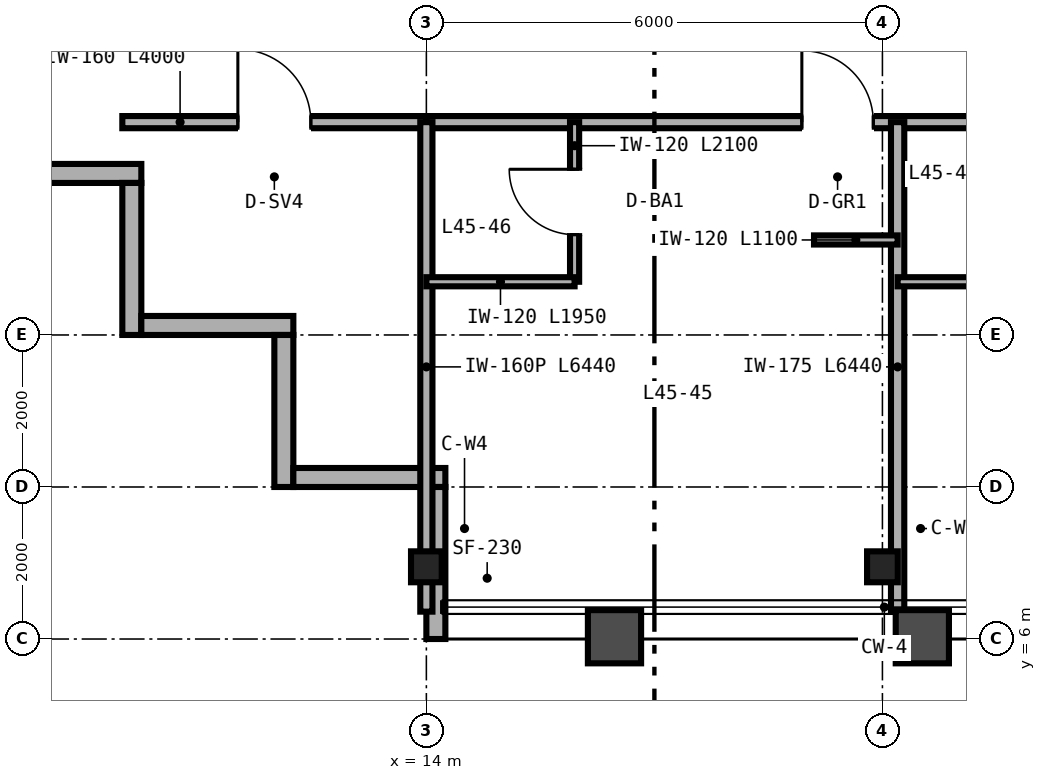
"""IFC4 building model, lengths in metres.
Left out: names, types, materials, properties, quantities, classifications, styles, units other than length and angle.
Written with IfcOpenShell. Run it as: python <this file> out.ifc"""

import sys

from ifc_helpers import new_model, si_unit, direction, frame, frame_2d, origin, origin_2d, place, context, subcontext, project, spatial, rectangle, i_section, extrude, source, transform, mapped, element, fill, save


model = new_model("IFC4")
c1 = context("Model", 3, precision=1e-05, world=origin(), true_north=direction((0.0, 1.0)))
c2 = subcontext(c1, "Body", "Model", "MODEL_VIEW")
j1 = project(units=[si_unit("LENGTHUNIT", "METRE"), si_unit("PLANEANGLEUNIT", "RADIAN")], contexts=[c1])
p1 = place(None, origin())
s1 = spatial("IfcSite", under=j1, at=p1, CompositionType="ELEMENT")
p2 = place(p1, origin())
s2 = spatial("IfcBuilding", under=s1, at=p2, CompositionType="ELEMENT")
p3 = place(p2, frame((0.0, 0.0, 181.2)))
s3 = spatial("IfcBuildingStorey", under=s2, at=p3, CompositionType="ELEMENT", Elevation=181.2)
m1 = source(origin(), c2, "Body", "SweptSolid", [
    extrude(i_section(OverallWidth=0.404, OverallDepth=0.407, WebThickness=0.027, FlangeThickness=0.044, FilletRadius=0.025, at=origin_2d()), origin(), (0.0, 0.0, 1.0), 3.37),
])
for number, where, z_axis, x_axis in (
    (1, (14.0, 6.95, 0.0), (0.0, 0.0, 1.0), (1.0, 0.0, 0.0)),
    (2, (20.0, 6.95, 0.0), (0.0, 0.0, 1.0), (1.0, 0.0, 0.0)),
):
    element("IfcColumn", number, at=place(p3, frame(where, z_axis=z_axis, x_axis=x_axis)), inside=s3, PredefinedType="COLUMN", context=c2, shape_type="MappedRepresentation", body=[
        mapped(m1, transform((0.0, 0.0, 0.0), scale=1.0)),
    ])
p4 = place(p3, frame((8.0, 12.125, 0.0), z_axis=(0.0, 0.0, 1.0), x_axis=(1.0, 0.0, 0.0)))
e3 = element("IfcWall", 3, at=p4, inside=s3, PredefinedType="SOLIDWALL", context=c2, shape_type="SweptSolid", body=[
    extrude(rectangle(XDim=2.25, YDim=0.25, at=frame_2d((1.125, 0.0))), origin(), (0.0, 0.0, 1.0), 3.37),
])
for number, where, z_axis, x_axis in (
    (4, (10.125, 12.0, 0.0), (0.0, 0.0, 1.0), (0.0, -1.0, 0.0)),
    (5, (10.25, 10.125, 0.0), (0.0, 0.0, 1.0), (1.0, 0.0, 0.0)),
    (6, (12.125, 10.0, 0.0), (0.0, 0.0, 1.0), (0.0, -1.0, 0.0)),
    (7, (12.25, 8.125, 0.0), (0.0, 0.0, 1.0), (1.0, 0.0, 0.0)),
):
    element("IfcWall", number, at=place(p3, frame(where, z_axis=z_axis, x_axis=x_axis)), inside=s3, PredefinedType="SOLIDWALL", context=c2, shape_type="SweptSolid", body=[
        extrude(rectangle(XDim=2.0, YDim=0.25, at=frame_2d((1.0, 0.0))), origin(), (0.0, 0.0, 1.0), 3.37),
    ])
p5 = place(p3, frame((14.125, 8.0, 0.0), z_axis=(0.0, 0.0, 1.0), x_axis=(0.0, -1.0, 0.0)))
e8 = element("IfcWall", 8, at=p5, inside=s3, PredefinedType="SOLIDWALL", context=c2, shape_type="SweptSolid", body=[
    extrude(rectangle(XDim=2.0, YDim=0.25, at=frame_2d((1.0, 0.0))), origin(), (0.0, 0.0, 1.0), 2.677),
])
p6 = place(p3, frame((10.0, 12.8, 0.0), z_axis=(0.0, 0.0, 1.0), x_axis=(1.0, 0.0, 0.0)))
e9 = element("IfcWall", 9, at=p6, inside=s3, PredefinedType="PARTITIONING", context=c2, shape_type="SweptSolid", body=[
    extrude(rectangle(XDim=4.0, YDim=0.16, at=frame_2d((2.0, 0.0))), origin(), (0.0, 0.0, 1.0), 3.37),
])
p7 = place(p6, frame((1.52, 0.0, 0.0)))
e10 = element("IfcOpeningElement", 10, at=p7, cuts=e9, PredefinedType="OPENING", context=c2, shape_type="SweptSolid", body=[
    extrude(rectangle(XDim=0.96, YDim=2.15, at=frame_2d((0.48, 1.075))), frame((0.0, 0.09, 0.0), z_axis=(0.0, -1.0, 0.0), x_axis=(1.0, 0.0, 0.0)), (0.0, 0.0, 1.0), 0.18),
])
p8 = place(p3, frame((14.0, 12.8, 0.0), z_axis=(0.0, 0.0, 1.0), x_axis=(1.0, 0.0, 0.0)))
e11 = element("IfcWall", 11, at=p8, inside=s3, PredefinedType="PARTITIONING", context=c2, shape_type="SweptSolid", body=[
    extrude(rectangle(XDim=12.0, YDim=0.16, at=frame_2d((6.0, 0.0))), origin(), (0.0, 0.0, 1.0), 2.913),
])
p9 = place(p8, frame((4.94, 0.0, 0.0)))
e12 = element("IfcOpeningElement", 12, at=p9, cuts=e11, PredefinedType="OPENING", context=c2, shape_type="SweptSolid", body=[
    extrude(rectangle(XDim=0.94, YDim=2.15, at=frame_2d((0.47, 1.075))), frame((0.0, 0.09, 0.0), z_axis=(0.0, -1.0, 0.0), x_axis=(1.0, 0.0, 0.0)), (0.0, 0.0, 1.0), 0.18),
])
p10 = place(p8, frame((10.74, 0.0, 0.0)))
e13 = element("IfcOpeningElement", 13, at=p10, cuts=e11, PredefinedType="OPENING", context=c2, shape_type="SweptSolid", body=[
    extrude(rectangle(XDim=0.94, YDim=2.15, at=frame_2d((0.47, 1.075))), frame((0.0, 0.09, 0.0), z_axis=(0.0, -1.0, 0.0), x_axis=(1.0, 0.0, 0.0)), (0.0, 0.0, 1.0), 0.18),
])
p11 = place(p3, frame((14.0, 6.36, 0.0), z_axis=(0.0, 0.0, 1.0), x_axis=(0.0, 1.0, 0.0)))
e14 = element("IfcWall", 14, at=p11, inside=s3, PredefinedType="PARTITIONING", context=c2, shape_type="SweptSolid", body=[
    extrude(rectangle(XDim=6.44, YDim=0.16, at=frame_2d((3.22, 0.0))), origin(), (0.0, 0.0, 1.0), 2.677),
])
p12 = place(p3, frame((20.2, 6.36, 0.0), z_axis=(0.0, 0.0, 1.0), x_axis=(0.0, 1.0, 0.0)))
e15 = element("IfcWall", 15, at=p12, inside=s3, PredefinedType="PARTITIONING", context=c2, shape_type="SweptSolid", body=[
    extrude(rectangle(XDim=6.44, YDim=0.175, at=frame_2d((3.22, 0.0))), origin(), (0.0, 0.0, 1.0), 2.677),
])
p13 = place(p3, frame((15.95, 10.7, 0.0), z_axis=(0.0, 0.0, 1.0), x_axis=(0.0, 1.0, 0.0)))
e16 = element("IfcWall", 16, at=p13, inside=s3, PredefinedType="PARTITIONING", context=c2, shape_type="SweptSolid", body=[
    extrude(rectangle(XDim=2.1, YDim=0.12, at=frame_2d((1.05, 0.0))), origin(), (0.0, 0.0, 1.0), 3.37),
])
p14 = place(p13, frame((0.62, 0.0, 0.0)))
e17 = element("IfcOpeningElement", 17, at=p14, cuts=e16, PredefinedType="OPENING", context=c2, shape_type="SweptSolid", body=[
    extrude(rectangle(XDim=0.86, YDim=2.1, at=frame_2d((0.43, 1.05))), frame((0.0, 0.07, 0.0), z_axis=(0.0, -1.0, 0.0), x_axis=(1.0, 0.0, 0.0)), (0.0, 0.0, 1.0), 0.14),
])
p15 = place(p3, frame((14.0, 10.7, 0.0), z_axis=(0.0, 0.0, 1.0), x_axis=(1.0, 0.0, 0.0)))
e18 = element("IfcWall", 18, at=p15, inside=s3, PredefinedType="PARTITIONING", context=c2, shape_type="SweptSolid", body=[
    extrude(rectangle(XDim=1.95, YDim=0.12, at=frame_2d((0.975, 0.0))), origin(), (0.0, 0.0, 1.0), 3.37),
])
p16 = place(p3, frame((19.1, 11.25, 0.0), z_axis=(0.0, 0.0, 1.0), x_axis=(1.0, 0.0, 0.0)))
e19 = element("IfcWall", 19, at=p16, inside=s3, PredefinedType="PARTITIONING", context=c2, shape_type="SweptSolid", body=[
    extrude(rectangle(XDim=1.1, YDim=0.12, at=frame_2d((0.55, 0.0))), origin(), (0.0, 0.0, 1.0), 3.37),
])
p17 = place(p3, frame((20.2, 10.7, 0.0), z_axis=(0.0, 0.0, 1.0), x_axis=(1.0, 0.0, 0.0)))
e20 = element("IfcWall", 20, at=p17, inside=s3, PredefinedType="PARTITIONING", context=c2, shape_type="SweptSolid", body=[
    extrude(rectangle(XDim=1.95, YDim=0.12, at=frame_2d((0.975, 0.0))), origin(), (0.0, 0.0, 1.0), 3.37),
])
m2 = source(origin(), c2, "Body", "SweptSolid", [
    extrude(rectangle(XDim=0.96, YDim=2.15, at=frame_2d((0.48, 1.075))), frame((0.0, 0.025, 0.0), z_axis=(0.0, -1.0, 0.0), x_axis=(1.0, 0.0, 0.0)), (0.0, 0.0, 1.0), 0.05),
])
p18 = place(p7, origin())
e21 = element("IfcDoor", 21, at=p18, inside=s3, OperationType="SINGLE_SWING_LEFT", PredefinedType="DOOR", context=c2, shape_type="MappedRepresentation", body=[
    mapped(m2, transform((0.0, 0.0, 0.0), scale=1.0)),
])
fill(e10, e21)
m3 = source(origin(), c2, "Body", "SweptSolid", [
    extrude(rectangle(XDim=0.86, YDim=2.1, at=frame_2d((0.43, 1.05))), frame((0.0, 0.025, 0.0), z_axis=(0.0, -1.0, 0.0), x_axis=(1.0, 0.0, 0.0)), (0.0, 0.0, 1.0), 0.05),
])
p19 = place(p14, origin())
e22 = element("IfcDoor", 22, at=p19, inside=s3, OperationType="SINGLE_SWING_RIGHT", PredefinedType="DOOR", context=c2, shape_type="MappedRepresentation", body=[
    mapped(m3, transform((0.0, 0.0, 0.0), scale=1.0)),
])
fill(e17, e22)
m4 = source(origin(), c2, "Body", "SweptSolid", [
    extrude(rectangle(XDim=0.94, YDim=2.15, at=frame_2d((0.47, 1.075))), frame((0.0, 0.025, 0.0), z_axis=(0.0, -1.0, 0.0), x_axis=(1.0, 0.0, 0.0)), (0.0, 0.0, 1.0), 0.05),
])
p20 = place(p9, origin())
e23 = element("IfcDoor", 23, at=p20, inside=s3, OperationType="SINGLE_SWING_LEFT", PredefinedType="DOOR", context=c2, shape_type="MappedRepresentation", body=[
    mapped(m4, transform((0.0, 0.0, 0.0), scale=1.0)),
])
fill(e12, e23)
save(model, sys.argv[1])
